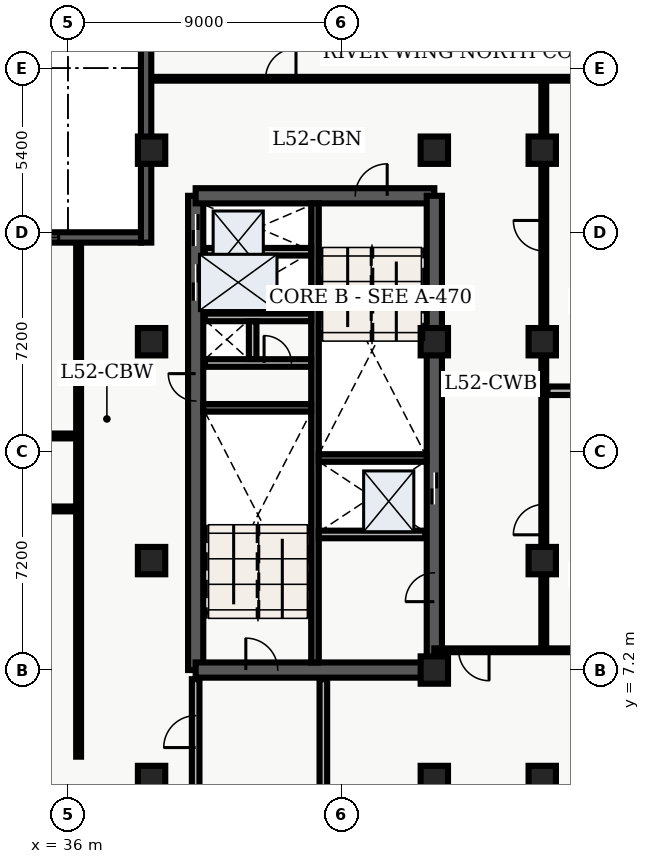
"""IFC4 building model, lengths in metres.
Left out: names, types, materials, properties, quantities, classifications, styles, units other than length and angle.
Written with IfcOpenShell. Run it as: python <this file> out.ifc"""

import sys

from ifc_helpers import new_model, entity, si_unit, converted_unit, direction, frame, origin_with_axes, origin_2d_with_axis, place, context, subcontext, project, spatial, polyline, rectangle, outline, extrude, element, fill, save


model = new_model("IFC4")
c1 = context("Model", 3, precision=1e-05, world=origin_with_axes(), true_north=direction((0.0, 1.0)))
c2 = subcontext(c1, "Body", "Model", "MODEL_VIEW")
j1 = project(units=[si_unit("LENGTHUNIT", "METRE"), converted_unit("PLANEANGLEUNIT", "DEGREE", entity("IfcPlaneAngleMeasure", 0.017), si_unit("PLANEANGLEUNIT", "RADIAN"), dimensions=[0, 0, 0, 0, 0, 0, 0])], contexts=[c1])
p1 = place(None, origin_with_axes())
s1 = spatial("IfcSite", under=j1, at=p1, CompositionType="ELEMENT")
p2 = place(p1, origin_with_axes())
s2 = spatial("IfcBuilding", under=s1, at=p2, CompositionType="ELEMENT")
p3 = place(p2, frame((0.0, 0.0, 212.1), z_axis=(0.0, 0.0, 1.0), x_axis=(1.0, 0.0, 0.0)))
s3 = spatial("IfcBuildingStorey", under=s2, at=p3, CompositionType="ELEMENT", Elevation=212.1)
p4 = place(p3, frame((40.2, 7.2, 0.0), z_axis=(0.0, 0.0, 1.0), x_axis=(0.0, 1.0, 0.0)))
e1 = element("IfcWall", 1, at=p4, inside=s3, PredefinedType="SHEAR", context=c2, shape_type="SweptSolid", body=[
    extrude(outline(polyline([(0.0, -0.25), (15.6, -0.25), (15.6, 0.25), (0.0, 0.25), (0.0, -0.25)])), origin_with_axes(), (0.0, 0.0, 1.0), 3.66),
])
p5 = place(p4, frame((14.475, 0.0, 0.0), z_axis=(0.0, 0.0, 1.0), x_axis=(1.0, 0.0, 0.0)))
e2 = element("IfcOpeningElement", 2, at=p5, cuts=e1, PredefinedType="OPENING", context=c2, shape_type="SweptSolid", body=[
    extrude(rectangle(XDim=1.05, YDim=0.52, at=origin_2d_with_axis()), origin_with_axes(), (0.0, 0.0, 1.0), 2.15),
])
p6 = place(p4, frame((12.75, 0.0, 0.0), z_axis=(0.0, 0.0, 1.0), x_axis=(1.0, 0.0, 0.0)))
e3 = element("IfcOpeningElement", 3, at=p6, cuts=e1, PredefinedType="OPENING", context=c2, shape_type="SweptSolid", body=[
    extrude(rectangle(XDim=1.2, YDim=0.52, at=origin_2d_with_axis()), origin_with_axes(), (0.0, 0.0, 1.0), 2.15),
])
p7 = place(p4, frame((9.3, 0.0, 0.0), z_axis=(0.0, 0.0, 1.0), x_axis=(1.0, 0.0, 0.0)))
e4 = element("IfcOpeningElement", 4, at=p7, cuts=e1, PredefinedType="OPENING", context=c2, shape_type="SweptSolid", body=[
    extrude(rectangle(XDim=0.9, YDim=0.52, at=origin_2d_with_axis()), origin_with_axes(), (0.0, 0.0, 1.0), 2.15),
])
p8 = place(p3, frame((40.2, 7.2, 0.0), z_axis=(0.0, 0.0, 1.0), x_axis=(1.0, 0.0, 0.0)))
e5 = element("IfcWall", 5, at=p8, inside=s3, PredefinedType="SHEAR", context=c2, shape_type="SweptSolid", body=[
    extrude(outline(polyline([(0.0, -0.25), (7.85, -0.25), (7.85, 0.25), (0.0, 0.25), (0.0, -0.25)])), origin_with_axes(), (0.0, 0.0, 1.0), 3.66),
])
p9 = place(p8, frame((2.175, 0.0, 0.0), z_axis=(0.0, 0.0, 1.0), x_axis=(1.0, 0.0, 0.0)))
e6 = element("IfcOpeningElement", 6, at=p9, cuts=e5, PredefinedType="OPENING", context=c2, shape_type="SweptSolid", body=[
    extrude(rectangle(XDim=1.05, YDim=0.52, at=origin_2d_with_axis()), origin_with_axes(), (0.0, 0.0, 1.0), 2.15),
])
p10 = place(p3, frame((40.2, 22.8, 0.0), z_axis=(0.0, 0.0, 1.0), x_axis=(1.0, 0.0, 0.0)))
e7 = element("IfcWall", 7, at=p10, inside=s3, PredefinedType="SHEAR", context=c2, shape_type="SweptSolid", body=[
    extrude(outline(polyline([(0.0, -0.25), (7.85, -0.25), (7.85, 0.25), (0.0, 0.25), (0.0, -0.25)])), origin_with_axes(), (0.0, 0.0, 1.0), 3.66),
])
p11 = place(p10, frame((5.775, 0.0, 0.0), z_axis=(0.0, 0.0, 1.0), x_axis=(1.0, 0.0, 0.0)))
e8 = element("IfcOpeningElement", 8, at=p11, cuts=e7, PredefinedType="OPENING", context=c2, shape_type="SweptSolid", body=[
    extrude(rectangle(XDim=1.05, YDim=0.52, at=origin_2d_with_axis()), origin_with_axes(), (0.0, 0.0, 1.0), 2.15),
])
p12 = place(p3, frame((48.05, 7.2, 0.0), z_axis=(0.0, 0.0, 1.0), x_axis=(0.0, 1.0, 0.0)))
e9 = element("IfcWall", 9, at=p12, inside=s3, PredefinedType="SHEAR", context=c2, shape_type="SweptSolid", body=[
    extrude(outline(polyline([(0.0, -0.25), (15.6, -0.25), (15.6, 0.25), (0.0, 0.25), (0.0, -0.25)])), origin_with_axes(), (0.0, 0.0, 1.0), 3.66),
])
p13 = place(p12, frame((5.975, 0.0, 0.0), z_axis=(0.0, 0.0, 1.0), x_axis=(1.0, 0.0, 0.0)))
e10 = element("IfcOpeningElement", 10, at=p13, cuts=e9, PredefinedType="OPENING", context=c2, shape_type="SweptSolid", body=[
    extrude(rectangle(XDim=1.05, YDim=0.52, at=origin_2d_with_axis()), origin_with_axes(), (0.0, 0.0, 1.0), 2.15),
])
p14 = place(p12, frame((2.725, 0.0, 0.0), z_axis=(0.0, 0.0, 1.0), x_axis=(1.0, 0.0, 0.0)))
e11 = element("IfcOpeningElement", 11, at=p14, cuts=e9, PredefinedType="OPENING", context=c2, shape_type="SweptSolid", body=[
    extrude(rectangle(XDim=0.95, YDim=0.52, at=origin_2d_with_axis()), origin_with_axes(), (0.0, 0.0, 1.0), 2.15),
])
p15 = place(p3, frame((44.125, 7.45, 0.0), z_axis=(0.0, 0.0, 1.0), x_axis=(0.0, 1.0, 0.0)))
e12 = element("IfcWall", 12, at=p15, inside=s3, PredefinedType="SHEAR", context=c2, shape_type="SweptSolid", body=[
    extrude(outline(polyline([(0.0, -0.125), (15.1, -0.125), (15.1, 0.125), (0.0, 0.125), (0.0, -0.125)])), origin_with_axes(), (0.0, 0.0, 1.0), 3.66),
])
for number, where, z_axis, x_axis in (
    (13, (40.45, 15.825, 0.0), (0.0, 0.0, 1.0), (1.0, 0.0, 0.0)),
    (14, (44.25, 14.175, 0.0), (0.0, 0.0, 1.0), (1.0, 0.0, 0.0)),
):
    element("IfcWall", number, at=place(p3, frame(where, z_axis=z_axis, x_axis=x_axis)), inside=s3, PredefinedType="SHEAR", context=c2, shape_type="SweptSolid", body=[
        extrude(outline(polyline([(0.0, -0.125), (3.55, -0.125), (3.55, 0.125), (0.0, 0.125), (0.0, -0.125)])), origin_with_axes(), (0.0, 0.0, 1.0), 3.66),
    ])
p16 = place(p3, frame((40.5, 17.3, 0.0), z_axis=(0.0, 0.0, 1.0), x_axis=(1.0, 0.0, 0.0)))
e15 = element("IfcWall", 15, at=p16, inside=s3, PredefinedType="SOLIDWALL", context=c2, shape_type="SweptSolid", body=[
    extrude(outline(polyline([(0.0, -0.125), (3.5, -0.125), (3.5, 0.125), (0.0, 0.125), (0.0, -0.125)])), origin_with_axes(), (0.0, 0.0, 1.0), 2.7),
])
p17 = place(p16, frame((2.4, 0.0, 0.0), z_axis=(0.0, 0.0, 1.0), x_axis=(1.0, 0.0, 0.0)))
e16 = element("IfcOpeningElement", 16, at=p17, cuts=e15, PredefinedType="OPENING", context=c2, shape_type="SweptSolid", body=[
    extrude(rectangle(XDim=0.9, YDim=0.27, at=origin_2d_with_axis()), origin_with_axes(), (0.0, 0.0, 1.0), 2.15),
])
p18 = place(p3, frame((40.5, 18.8, 0.0), z_axis=(0.0, 0.0, 1.0), x_axis=(1.0, 0.0, 0.0)))
e17 = element("IfcWall", 17, at=p18, inside=s3, PredefinedType="SOLIDWALL", context=c2, shape_type="SweptSolid", body=[
    extrude(outline(polyline([(0.0, -0.125), (3.5, -0.125), (3.5, 0.125), (0.0, 0.125), (0.0, -0.125)])), origin_with_axes(), (0.0, 0.0, 1.0), 2.7),
])
p19 = place(p3, frame((42.075, 17.43, 0.0), z_axis=(0.0, 0.0, 1.0), x_axis=(0.0, 1.0, 0.0)))
e18 = element("IfcWall", 18, at=p19, inside=s3, PredefinedType="SOLIDWALL", context=c2, shape_type="SweptSolid", body=[
    extrude(outline(polyline([(0.0, -0.125), (1.24, -0.125), (1.24, 0.125), (0.0, 0.125), (0.0, -0.125)])), origin_with_axes(), (0.0, 0.0, 1.0), 2.7),
])
p20 = place(p3, frame((40.2, 3.1, 0.0), z_axis=(0.0, 0.0, 1.0), x_axis=(0.0, 1.0, 0.0)))
e19 = element("IfcWall", 19, at=p20, inside=s3, PredefinedType="SOLIDWALL", context=c2, shape_type="SweptSolid", body=[
    extrude(outline(polyline([(0.0, -0.125), (3.8, -0.125), (3.8, 0.125), (0.0, 0.125), (0.0, -0.125)])), origin_with_axes(), (0.0, 0.0, 1.0), 2.7),
])
p21 = place(p20, frame((2.075, 0.0, 0.0), z_axis=(0.0, 0.0, 1.0), x_axis=(1.0, 0.0, 0.0)))
e20 = element("IfcOpeningElement", 20, at=p21, cuts=e19, PredefinedType="OPENING", context=c2, shape_type="SweptSolid", body=[
    extrude(rectangle(XDim=1.05, YDim=0.27, at=origin_2d_with_axis()), origin_with_axes(), (0.0, 0.0, 1.0), 2.15),
])
p22 = place(p3, frame((44.4, 3.1, 0.0), z_axis=(0.0, 0.0, 1.0), x_axis=(0.0, 1.0, 0.0)))
e21 = element("IfcWall", 21, at=p22, inside=s3, PredefinedType="SOLIDWALL", context=c2, shape_type="SweptSolid", body=[
    extrude(outline(polyline([(0.0, -0.125), (3.8, -0.125), (3.8, 0.125), (0.0, 0.125), (0.0, -0.125)])), origin_with_axes(), (0.0, 0.0, 1.0), 2.7),
])
for number, where, z_axis, x_axis in (
    (22, (38.75, 3.6, 0.0), (0.0, 0.0, 1.0), (1.0, 0.0, 0.0)),
    (23, (38.75, 10.8, 0.0), (0.0, 0.0, 1.0), (1.0, 0.0, 0.0)),
    (24, (38.75, 18.0, 0.0), (0.0, 0.0, 1.0), (1.0, 0.0, 0.0)),
    (25, (38.75, 24.3, 0.0), (0.0, 0.0, 1.0), (1.0, 0.0, 0.0)),
    (26, (48.05, 3.6, 0.0), (0.0, 0.0, 1.0), (1.0, 0.0, 0.0)),
    (27, (48.05, 7.2, 0.0), (0.0, 0.0, 1.0), (1.0, 0.0, 0.0)),
    (28, (48.05, 18.0, 0.0), (0.0, 0.0, 1.0), (1.0, 0.0, 0.0)),
    (29, (48.05, 24.3, 0.0), (0.0, 0.0, 1.0), (1.0, 0.0, 0.0)),
    (30, (51.6, 3.6, 0.0), (0.0, 0.0, 1.0), (1.0, 0.0, 0.0)),
    (31, (51.6, 10.8, 0.0), (0.0, 0.0, 1.0), (1.0, 0.0, 0.0)),
    (32, (51.6, 18.0, 0.0), (0.0, 0.0, 1.0), (1.0, 0.0, 0.0)),
    (33, (51.6, 24.3, 0.0), (0.0, 0.0, 1.0), (1.0, 0.0, 0.0)),
):
    element("IfcColumn", number, at=place(p3, frame(where, z_axis=z_axis, x_axis=x_axis)), inside=s3, PredefinedType="COLUMN", context=c2, shape_type="SweptSolid", body=[
        extrude(rectangle(XDim=0.9, YDim=0.9, at=origin_2d_with_axis()), origin_with_axes(), (0.0, 0.0, 1.0), 3.9),
    ])
for number, where, z_axis, x_axis in (
    (34, (40.5, 20.96, 0.0), (0.0, 0.0, 1.0), (1.0, 0.0, 0.0)),
    (35, (44.25, 11.66, 0.0), (0.0, 0.0, 1.0), (1.0, 0.0, 0.0)),
):
    element("IfcWall", number, at=place(p3, frame(where, z_axis=z_axis, x_axis=x_axis)), inside=s3, PredefinedType="SOLIDWALL", context=c2, shape_type="SweptSolid", body=[
        extrude(outline(polyline([(0.0, -0.125), (3.5, -0.125), (3.5, 0.125), (0.0, 0.125), (0.0, -0.125)])), origin_with_axes(), (0.0, 0.0, 1.0), 2.7),
    ])
p23 = place(p3, frame((21.15, 12.5, 0.0), z_axis=(0.0, 0.0, 1.0), x_axis=(1.0, 0.0, 0.0)))
e36 = element("IfcWall", 36, at=p23, inside=s3, PredefinedType="PARTITIONING", context=c2, shape_type="SweptSolid", body=[
    extrude(outline(polyline([(0.0, -0.08), (15.2, -0.08), (15.2, 0.08), (0.0, 0.08), (0.0, -0.08)])), origin_with_axes(), (0.0, 0.0, 1.0), 2.7),
])
p24 = place(p23, frame((7.65, 0.0, 0.0), z_axis=(0.0, 0.0, 1.0), x_axis=(1.0, 0.0, 0.0)))
e37 = element("IfcOpeningElement", 37, at=p24, cuts=e36, PredefinedType="OPENING", context=c2, shape_type="SweptSolid", body=[
    extrude(rectangle(XDim=1.2, YDim=0.18, at=origin_2d_with_axis()), origin_with_axes(), (0.0, 0.0, 1.0), 2.2),
])
p25 = place(p3, frame((21.15, 14.9, 0.0), z_axis=(0.0, 0.0, 1.0), x_axis=(1.0, 0.0, 0.0)))
e38 = element("IfcWall", 38, at=p25, inside=s3, PredefinedType="PARTITIONING", context=c2, shape_type="SweptSolid", body=[
    extrude(outline(polyline([(0.0, -0.08), (15.2, -0.08), (15.2, 0.08), (0.0, 0.08), (0.0, -0.08)])), origin_with_axes(), (0.0, 0.0, 1.0), 2.7),
])
p26 = place(p25, frame((1.753, 0.0, 0.0), z_axis=(0.0, 0.0, 1.0), x_axis=(1.0, 0.0, 0.0)))
e39 = element("IfcOpeningElement", 39, at=p26, cuts=e38, PredefinedType="OPENING", context=c2, shape_type="SweptSolid", body=[
    extrude(rectangle(XDim=1.0, YDim=0.18, at=origin_2d_with_axis()), origin_with_axes(), (0.0, 0.0, 1.0), 2.15),
])
p27 = place(p25, frame((4.888, 0.0, 0.0), z_axis=(0.0, 0.0, 1.0), x_axis=(1.0, 0.0, 0.0)))
e40 = element("IfcOpeningElement", 40, at=p27, cuts=e38, PredefinedType="OPENING", context=c2, shape_type="SweptSolid", body=[
    extrude(rectangle(XDim=1.0, YDim=0.18, at=origin_2d_with_axis()), origin_with_axes(), (0.0, 0.0, 1.0), 2.15),
])
p28 = place(p25, frame((8.534, 0.0, 0.0), z_axis=(0.0, 0.0, 1.0), x_axis=(1.0, 0.0, 0.0)))
e41 = element("IfcOpeningElement", 41, at=p28, cuts=e38, PredefinedType="OPENING", context=c2, shape_type="SweptSolid", body=[
    extrude(rectangle(XDim=1.0, YDim=0.18, at=origin_2d_with_axis()), origin_with_axes(), (0.0, 0.0, 1.0), 2.15),
])
p29 = place(p25, frame((12.869, 0.0, 0.0), z_axis=(0.0, 0.0, 1.0), x_axis=(1.0, 0.0, 0.0)))
e42 = element("IfcOpeningElement", 42, at=p29, cuts=e38, PredefinedType="OPENING", context=c2, shape_type="SweptSolid", body=[
    extrude(rectangle(XDim=1.2, YDim=0.18, at=origin_2d_with_axis()), origin_with_axes(), (0.0, 0.0, 1.0), 2.2),
])
p30 = place(p3, frame((36.35, 4.35, 0.0), z_axis=(0.0, 0.0, 1.0), x_axis=(0.0, 1.0, 0.0)))
e43 = element("IfcWall", 43, at=p30, inside=s3, PredefinedType="PARTITIONING", context=c2, shape_type="SweptSolid", body=[
    extrude(outline(polyline([(0.0, -0.08), (16.95, -0.08), (16.95, 0.08), (0.0, 0.08), (0.0, -0.08)])), origin_with_axes(), (0.0, 0.0, 1.0), 2.7),
])
p31 = place(p3, frame((51.65, 7.85, 0.0), z_axis=(0.0, 0.0, 1.0), x_axis=(0.0, 1.0, 0.0)))
e44 = element("IfcWall", 44, at=p31, inside=s3, PredefinedType="PARTITIONING", context=c2, shape_type="SweptSolid", body=[
    extrude(outline(polyline([(0.0, -0.08), (18.8, -0.08), (18.8, 0.08), (0.0, 0.08), (0.0, -0.08)])), origin_with_axes(), (0.0, 0.0, 1.0), 2.7),
])
p32 = place(p31, frame((4.298, 0.0, 0.0), z_axis=(0.0, 0.0, 1.0), x_axis=(1.0, 0.0, 0.0)))
e45 = element("IfcOpeningElement", 45, at=p32, cuts=e44, PredefinedType="OPENING", context=c2, shape_type="SweptSolid", body=[
    extrude(rectangle(XDim=1.0, YDim=0.18, at=origin_2d_with_axis()), origin_with_axes(), (0.0, 0.0, 1.0), 2.15),
])
p33 = place(p31, frame((13.639, 0.0, 0.0), z_axis=(0.0, 0.0, 1.0), x_axis=(1.0, 0.0, 0.0)))
e46 = element("IfcOpeningElement", 46, at=p33, cuts=e44, PredefinedType="OPENING", context=c2, shape_type="SweptSolid", body=[
    extrude(rectangle(XDim=1.0, YDim=0.18, at=origin_2d_with_axis()), origin_with_axes(), (0.0, 0.0, 1.0), 2.15),
])
p34 = place(p3, frame((59.665, 7.85, 0.0), z_axis=(0.0, 0.0, 1.0), x_axis=(-1.0, 0.0, 0.0)))
e47 = element("IfcWall", 47, at=p34, inside=s3, PredefinedType="PARTITIONING", context=c2, shape_type="SweptSolid", body=[
    extrude(outline(polyline([(0.0, -0.062), (11.615, -0.062), (11.615, 0.062), (0.0, 0.062), (0.0, -0.062)])), origin_with_axes(), (0.0, 0.0, 1.0), 2.7),
])
p35 = place(p34, frame((10.315, 0.0, 0.0), z_axis=(0.0, 0.0, 1.0), x_axis=(1.0, 0.0, 0.0)))
e48 = element("IfcOpeningElement", 48, at=p35, cuts=e47, PredefinedType="OPENING", context=c2, shape_type="SweptSolid", body=[
    extrude(rectangle(XDim=1.0, YDim=0.145, at=origin_2d_with_axis()), origin_with_axes(), (0.0, 0.0, 1.0), 2.15),
])
p36 = place(p3, frame((38.735, 26.65, 0.0), z_axis=(0.0, 0.0, 1.0), x_axis=(1.0, 0.0, 0.0)))
e49 = element("IfcWall", 49, at=p36, inside=s3, PredefinedType="PARTITIONING", context=c2, shape_type="SweptSolid", body=[
    extrude(outline(polyline([(0.0, -0.062), (20.905, -0.062), (20.905, 0.062), (0.0, 0.062), (0.0, -0.062)])), origin_with_axes(), (0.0, 0.0, 1.0), 2.7),
])
p37 = place(p36, frame((4.265, 0.0, 0.0), z_axis=(0.0, 0.0, 1.0), x_axis=(1.0, 0.0, 0.0)))
e50 = element("IfcOpeningElement", 50, at=p37, cuts=e49, PredefinedType="OPENING", context=c2, shape_type="SweptSolid", body=[
    extrude(rectangle(XDim=1.0, YDim=0.145, at=origin_2d_with_axis()), origin_with_axes(), (0.0, 0.0, 1.0), 2.15),
])
p38 = place(p3, frame((51.77, 16.387, 0.0), z_axis=(0.0, 0.0, 1.0), x_axis=(1.0, 0.0, 0.0)))
e51 = element("IfcWall", 51, at=p38, inside=s3, PredefinedType="PARTITIONING", context=c2, shape_type="SweptSolid", body=[
    extrude(outline(polyline([(0.0, -0.14), (7.895, -0.14), (7.895, 0.14), (0.0, 0.14), (0.0, -0.14)])), origin_with_axes(), (0.0, 0.0, 1.0), 2.7),
])
p39 = place(p3, frame((38.57, 21.26, 0.0), z_axis=(0.0, 0.0, 1.0), x_axis=(0.0, 1.0, 0.0)))
e52 = element("IfcWall", 52, at=p39, inside=s3, PredefinedType="SOLIDWALL", context=c2, shape_type="SweptSolid", body=[
    extrude(outline(polyline([(0.0, -0.17), (7.54, -0.17), (7.54, 0.17), (0.0, 0.17), (0.0, -0.17)])), origin_with_axes(), (0.0, 0.0, 1.0), 3.66),
])
p40 = place(p3, frame((31.185, 21.43, 0.0), z_axis=(0.0, 0.0, 1.0), x_axis=(1.0, 0.0, 0.0)))
e53 = element("IfcWall", 53, at=p40, inside=s3, PredefinedType="SOLIDWALL", context=c2, shape_type="SweptSolid", body=[
    extrude(outline(polyline([(0.0, -0.17), (7.215, -0.17), (7.215, 0.17), (0.0, 0.17), (0.0, -0.17)])), origin_with_axes(), (0.0, 0.0, 1.0), 3.66),
])
p41 = place(p40, frame((3.608, 0.0, 0.45), z_axis=(0.0, 0.0, 1.0), x_axis=(1.0, 0.0, 0.0)))
e54 = element("IfcOpeningElement", 54, at=p41, cuts=e53, PredefinedType="OPENING", context=c2, shape_type="SweptSolid", body=[
    extrude(rectangle(XDim=1.8, YDim=0.36, at=origin_2d_with_axis()), origin_with_axes(), (0.0, 0.0, 1.0), 2.1),
])
p42 = place(p12, frame((5.975, 0.0, 0.0), z_axis=(0.0, 0.0, 1.0), x_axis=(1.0, 0.0, 0.0)))
e55 = element("IfcDoor", 55, at=p42, inside=s3, OperationType="SLIDING_TO_LEFT", PredefinedType="DOOR", context=c2, shape_type="SweptSolid", body=[
    extrude(rectangle(XDim=1.05, YDim=0.09, at=origin_2d_with_axis()), origin_with_axes(), (0.0, 0.0, 1.0), 2.15),
])
fill(e10, e55)
p43 = place(p4, frame((14.475, 0.0, 0.0), z_axis=(0.0, 0.0, 1.0), x_axis=(1.0, 0.0, 0.0)))
e56 = element("IfcDoor", 56, at=p43, inside=s3, OperationType="SLIDING_TO_RIGHT", PredefinedType="DOOR", context=c2, shape_type="SweptSolid", body=[
    extrude(rectangle(XDim=1.05, YDim=0.09, at=origin_2d_with_axis()), origin_with_axes(), (0.0, 0.0, 1.0), 2.15),
])
fill(e2, e56)
p44 = place(p4, frame((12.75, 0.0, 0.0), z_axis=(0.0, 0.0, 1.0), x_axis=(1.0, 0.0, 0.0)))
e57 = element("IfcDoor", 57, at=p44, inside=s3, OperationType="DOUBLE_DOOR_SLIDING", PredefinedType="DOOR", context=c2, shape_type="SweptSolid", body=[
    extrude(rectangle(XDim=1.2, YDim=0.09, at=origin_2d_with_axis()), origin_with_axes(), (0.0, 0.0, 1.0), 2.15),
])
fill(e3, e57)
p45 = place(p4, frame((9.3, 0.0, 0.0), z_axis=(0.0, 0.0, 1.0), x_axis=(1.0, 0.0, 0.0)))
e58 = element("IfcDoor", 58, at=p45, inside=s3, OperationType="SINGLE_SWING_RIGHT", PredefinedType="DOOR", context=c2, shape_type="SweptSolid", body=[
    extrude(rectangle(XDim=0.9, YDim=0.09, at=origin_2d_with_axis()), origin_with_axes(), (0.0, 0.0, 1.0), 2.15),
])
fill(e4, e58)
p46 = place(p16, frame((2.4, 0.0, 0.0), z_axis=(0.0, 0.0, 1.0), x_axis=(1.0, 0.0, 0.0)))
e59 = element("IfcDoor", 59, at=p46, inside=s3, OperationType="SINGLE_SWING_LEFT", PredefinedType="DOOR", context=c2, shape_type="SweptSolid", body=[
    extrude(rectangle(XDim=0.9, YDim=0.09, at=origin_2d_with_axis()), origin_with_axes(), (0.0, 0.0, 1.0), 2.15),
])
fill(e16, e59)
p47 = place(p8, frame((2.175, 0.0, 0.0), z_axis=(0.0, 0.0, 1.0), x_axis=(1.0, 0.0, 0.0)))
e60 = element("IfcDoor", 60, at=p47, inside=s3, OperationType="SINGLE_SWING_LEFT", PredefinedType="DOOR", context=c2, shape_type="SweptSolid", body=[
    extrude(rectangle(XDim=1.05, YDim=0.09, at=origin_2d_with_axis()), origin_with_axes(), (0.0, 0.0, 1.0), 2.15),
])
fill(e6, e60)
p48 = place(p10, frame((5.775, 0.0, 0.0), z_axis=(0.0, 0.0, 1.0), x_axis=(1.0, 0.0, 0.0)))
e61 = element("IfcDoor", 61, at=p48, inside=s3, OperationType="SINGLE_SWING_RIGHT", PredefinedType="DOOR", context=c2, shape_type="SweptSolid", body=[
    extrude(rectangle(XDim=1.05, YDim=0.09, at=origin_2d_with_axis()), origin_with_axes(), (0.0, 0.0, 1.0), 2.15),
])
fill(e8, e61)
p49 = place(p20, frame((2.075, 0.0, 0.0), z_axis=(0.0, 0.0, 1.0), x_axis=(1.0, 0.0, 0.0)))
e62 = element("IfcDoor", 62, at=p49, inside=s3, OperationType="SINGLE_SWING_LEFT", PredefinedType="DOOR", context=c2, shape_type="SweptSolid", body=[
    extrude(rectangle(XDim=1.05, YDim=0.09, at=origin_2d_with_axis()), origin_with_axes(), (0.0, 0.0, 1.0), 2.15),
])
fill(e20, e62)
p50 = place(p12, frame((2.725, 0.0, 0.0), z_axis=(0.0, 0.0, 1.0), x_axis=(1.0, 0.0, 0.0)))
e63 = element("IfcDoor", 63, at=p50, inside=s3, OperationType="SINGLE_SWING_LEFT", PredefinedType="DOOR", context=c2, shape_type="SweptSolid", body=[
    extrude(rectangle(XDim=0.95, YDim=0.09, at=origin_2d_with_axis()), origin_with_axes(), (0.0, 0.0, 1.0), 2.15),
])
fill(e11, e63)
p51 = place(p34, frame((10.315, 0.0, 0.0), z_axis=(0.0, 0.0, 1.0), x_axis=(1.0, 0.0, 0.0)))
e64 = element("IfcDoor", 64, at=p51, inside=s3, OperationType="SINGLE_SWING_LEFT", PredefinedType="DOOR", context=c2, shape_type="SweptSolid", body=[
    extrude(rectangle(XDim=1.0, YDim=0.075, at=origin_2d_with_axis()), origin_with_axes(), (0.0, 0.0, 1.0), 2.15),
])
fill(e48, e64)
p52 = place(p36, frame((4.265, 0.0, 0.0), z_axis=(0.0, 0.0, 1.0), x_axis=(1.0, 0.0, 0.0)))
e65 = element("IfcDoor", 65, at=p52, inside=s3, OperationType="SINGLE_SWING_RIGHT", PredefinedType="DOOR", context=c2, shape_type="SweptSolid", body=[
    extrude(rectangle(XDim=1.0, YDim=0.075, at=origin_2d_with_axis()), origin_with_axes(), (0.0, 0.0, 1.0), 2.15),
])
fill(e50, e65)
p53 = place(p31, frame((4.298, 0.0, 0.0), z_axis=(0.0, 0.0, 1.0), x_axis=(1.0, 0.0, 0.0)))
e66 = element("IfcDoor", 66, at=p53, inside=s3, OperationType="SINGLE_SWING_LEFT", PredefinedType="DOOR", context=c2, shape_type="SweptSolid", body=[
    extrude(rectangle(XDim=1.0, YDim=0.09, at=origin_2d_with_axis()), origin_with_axes(), (0.0, 0.0, 1.0), 2.15),
])
fill(e45, e66)
p54 = place(p31, frame((13.639, 0.0, 0.0), z_axis=(0.0, 0.0, 1.0), x_axis=(1.0, 0.0, 0.0)))
e67 = element("IfcDoor", 67, at=p54, inside=s3, OperationType="SINGLE_SWING_RIGHT", PredefinedType="DOOR", context=c2, shape_type="SweptSolid", body=[
    extrude(rectangle(XDim=1.0, YDim=0.09, at=origin_2d_with_axis()), origin_with_axes(), (0.0, 0.0, 1.0), 2.15),
])
fill(e46, e67)
p55 = place(p40, frame((3.608, 0.0, 0.45), z_axis=(0.0, 0.0, 1.0), x_axis=(1.0, 0.0, 0.0)))
e68 = element("IfcWindow", 68, at=p55, inside=s3, PredefinedType="WINDOW", context=c2, shape_type="SweptSolid", body=[
    extrude(rectangle(XDim=1.8, YDim=0.09, at=origin_2d_with_axis()), origin_with_axes(), (0.0, 0.0, 1.0), 2.1),
])
fill(e54, e68)
save(model, sys.argv[1])
